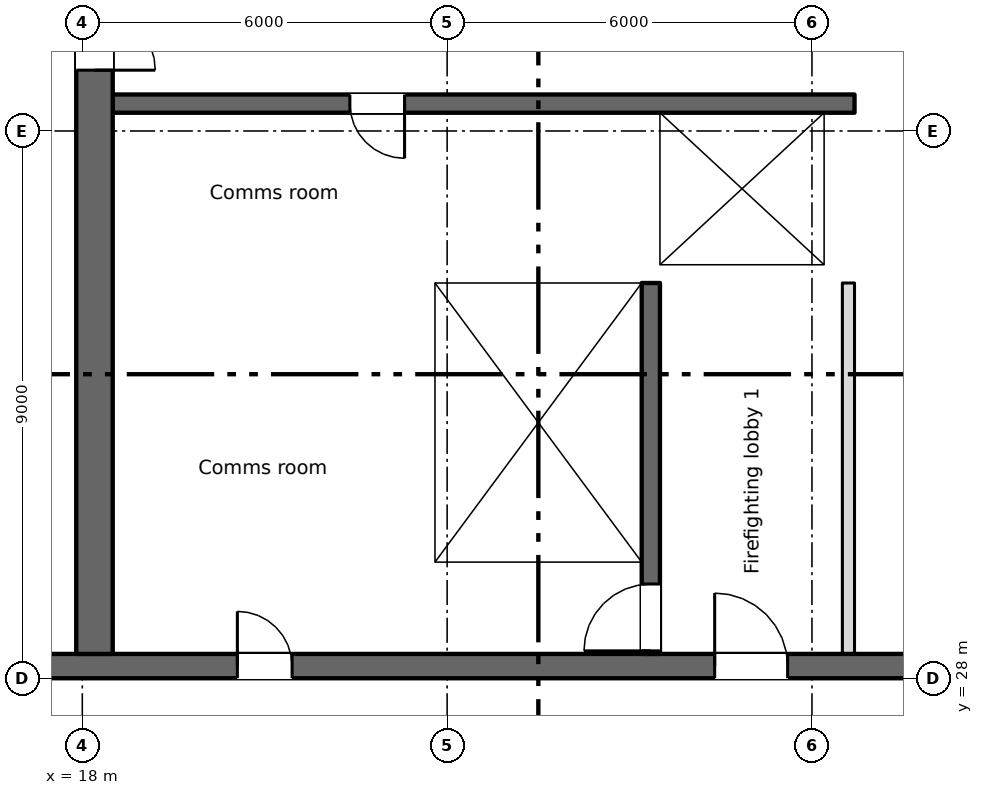
"""IFC4 building model, lengths in metres.
Left out: names, types, materials, properties, quantities, classifications, styles, units other than length and angle.
Written with IfcOpenShell. Run it as: python <this file> out.ifc"""

import sys

from ifc_helpers import new_model, si_unit, direction, frame, frame_2d, origin, place, context, subcontext, project, spatial, rectangle, extrude, element, fill, save


model = new_model("IFC4")
c1 = context("Model", 3, precision=1e-05, world=origin(), true_north=direction((0.0, 1.0)))
c2 = subcontext(c1, "Body", "Model", "MODEL_VIEW")
j1 = project(units=[si_unit("LENGTHUNIT", "METRE"), si_unit("PLANEANGLEUNIT", "RADIAN")], contexts=[c1])
p1 = place(None, origin())
s1 = spatial("IfcSite", under=j1, at=p1, CompositionType="ELEMENT")
p2 = place(p1, origin())
s2 = spatial("IfcBuilding", under=s1, at=p2, CompositionType="ELEMENT")
p3 = place(p2, frame((0.0, 0.0, 246.95)))
s3 = spatial("IfcBuildingStorey", under=s2, at=p3, CompositionType="ELEMENT", Elevation=246.95)
p4 = place(p3, frame((6.5, 28.2, 0.0), z_axis=(0.0, 0.0, 1.0), x_axis=(1.0, 0.0, 0.0)))
e1 = element("IfcWall", 1, at=p4, inside=s3, PredefinedType="SHEAR", context=c2, shape_type="SweptSolid", body=[
    extrude(rectangle(XDim=58.0, YDim=0.4, at=frame_2d((29.0, 0.0))), origin(), (0.0, 0.0, 1.0), 3.4),
])
p5 = place(p4, frame((14.05, 0.0, 0.0)))
e2 = element("IfcOpeningElement", 2, at=p5, cuts=e1, PredefinedType="OPENING", context=c2, shape_type="SweptSolid", body=[
    extrude(rectangle(XDim=0.9, YDim=2.1, at=frame_2d((0.45, 1.05))), frame((0.0, 0.21, 0.0), z_axis=(0.0, -1.0, 0.0), x_axis=(1.0, 0.0, 0.0)), (0.0, 0.0, 1.0), 0.42),
])
p6 = place(p4, frame((48.762, 0.0, 0.0)))
e3 = element("IfcOpeningElement", 3, at=p6, cuts=e1, PredefinedType="OPENING", context=c2, shape_type="SweptSolid", body=[
    extrude(rectangle(XDim=0.9, YDim=2.1, at=frame_2d((0.45, 1.05))), frame((0.0, 0.21, 0.0), z_axis=(0.0, -1.0, 0.0), x_axis=(1.0, 0.0, 0.0)), (0.0, 0.0, 1.0), 0.42),
])
p7 = place(p4, frame((51.337, 0.0, 0.0)))
e4 = element("IfcOpeningElement", 4, at=p7, cuts=e1, PredefinedType="OPENING", context=c2, shape_type="SweptSolid", body=[
    extrude(rectangle(XDim=0.9, YDim=2.1, at=frame_2d((0.45, 1.05))), frame((0.0, 0.21, 0.0), z_axis=(0.0, -1.0, 0.0), x_axis=(1.0, 0.0, 0.0)), (0.0, 0.0, 1.0), 0.42),
])
p8 = place(p4, frame((1.55, 0.0, 0.0)))
e5 = element("IfcOpeningElement", 5, at=p8, cuts=e1, PredefinedType="OPENING", context=c2, shape_type="SweptSolid", body=[
    extrude(rectangle(XDim=0.9, YDim=2.1, at=frame_2d((0.45, 1.05))), frame((0.0, 0.21, 0.0), z_axis=(0.0, -1.0, 0.0), x_axis=(1.0, 0.0, 0.0)), (0.0, 0.0, 1.0), 0.42),
])
p9 = place(p4, frame((4.9, 0.0, 0.0)))
e6 = element("IfcOpeningElement", 6, at=p9, cuts=e1, PredefinedType="OPENING", context=c2, shape_type="SweptSolid", body=[
    extrude(rectangle(XDim=1.2, YDim=2.1, at=frame_2d((0.6, 1.05))), frame((0.0, 0.21, 0.0), z_axis=(0.0, -1.0, 0.0), x_axis=(1.0, 0.0, 0.0)), (0.0, 0.0, 1.0), 0.42),
])
p10 = place(p4, frame((31.9, 0.0, 0.0)))
e7 = element("IfcOpeningElement", 7, at=p10, cuts=e1, PredefinedType="OPENING", context=c2, shape_type="SweptSolid", body=[
    extrude(rectangle(XDim=1.2, YDim=2.1, at=frame_2d((0.6, 1.05))), frame((0.0, 0.21, 0.0), z_axis=(0.0, -1.0, 0.0), x_axis=(1.0, 0.0, 0.0)), (0.0, 0.0, 1.0), 0.42),
])
p11 = place(p4, frame((55.4, 0.0, 0.0)))
e8 = element("IfcOpeningElement", 8, at=p11, cuts=e1, PredefinedType="OPENING", context=c2, shape_type="SweptSolid", body=[
    extrude(rectangle(XDim=1.2, YDim=2.1, at=frame_2d((0.6, 1.05))), frame((0.0, 0.21, 0.0), z_axis=(0.0, -1.0, 0.0), x_axis=(1.0, 0.0, 0.0)), (0.0, 0.0, 1.0), 0.42),
])
p12 = place(p4, frame((21.9, 0.0, 0.0)))
e9 = element("IfcOpeningElement", 9, at=p12, cuts=e1, PredefinedType="OPENING", context=c2, shape_type="SweptSolid", body=[
    extrude(rectangle(XDim=1.2, YDim=2.1, at=frame_2d((0.6, 1.05))), frame((0.0, 0.21, 0.0), z_axis=(0.0, -1.0, 0.0), x_axis=(1.0, 0.0, 0.0)), (0.0, 0.0, 1.0), 0.42),
])
p13 = place(p4, frame((41.9, 0.0, 0.0)))
e10 = element("IfcOpeningElement", 10, at=p13, cuts=e1, PredefinedType="OPENING", context=c2, shape_type="SweptSolid", body=[
    extrude(rectangle(XDim=1.2, YDim=2.1, at=frame_2d((0.6, 1.05))), frame((0.0, 0.21, 0.0), z_axis=(0.0, -1.0, 0.0), x_axis=(1.0, 0.0, 0.0)), (0.0, 0.0, 1.0), 0.42),
])
p14 = place(p4, frame((25.05, 0.0, 0.0)))
e11 = element("IfcOpeningElement", 11, at=p14, cuts=e1, PredefinedType="OPENING", context=c2, shape_type="SweptSolid", body=[
    extrude(rectangle(XDim=2.4, YDim=2.1, at=frame_2d((1.2, 1.05))), frame((0.0, 0.21, 0.0), z_axis=(0.0, -1.0, 0.0), x_axis=(1.0, 0.0, 0.0)), (0.0, 0.0, 1.0), 0.42),
])
p15 = place(p4, frame((37.55, 0.0, 0.0)))
e12 = element("IfcOpeningElement", 12, at=p15, cuts=e1, PredefinedType="OPENING", context=c2, shape_type="SweptSolid", body=[
    extrude(rectangle(XDim=2.4, YDim=2.1, at=frame_2d((1.2, 1.05))), frame((0.0, 0.21, 0.0), z_axis=(0.0, -1.0, 0.0), x_axis=(1.0, 0.0, 0.0)), (0.0, 0.0, 1.0), 0.42),
])
p16 = place(p4, frame((8.25, 0.0, 0.0)))
e13 = element("IfcOpeningElement", 13, at=p16, cuts=e1, PredefinedType="OPENING", context=c2, shape_type="SweptSolid", body=[
    extrude(rectangle(XDim=2.4, YDim=2.1, at=frame_2d((1.2, 1.05))), frame((0.0, 0.21, 0.0), z_axis=(0.0, -1.0, 0.0), x_axis=(1.0, 0.0, 0.0)), (0.0, 0.0, 1.0), 0.42),
])
p17 = place(p4, frame((29.05, 0.0, 0.0)))
e14 = element("IfcOpeningElement", 14, at=p17, cuts=e1, PredefinedType="OPENING", context=c2, shape_type="SweptSolid", body=[
    extrude(rectangle(XDim=0.9, YDim=2.1, at=frame_2d((0.45, 1.05))), frame((0.0, 0.21, 0.0), z_axis=(0.0, -1.0, 0.0), x_axis=(1.0, 0.0, 0.0)), (0.0, 0.0, 1.0), 0.42),
])
p18 = place(p4, frame((35.05, 0.0, 0.0)))
e15 = element("IfcOpeningElement", 15, at=p18, cuts=e1, PredefinedType="OPENING", context=c2, shape_type="SweptSolid", body=[
    extrude(rectangle(XDim=0.9, YDim=2.1, at=frame_2d((0.45, 1.05))), frame((0.0, 0.21, 0.0), z_axis=(0.0, -1.0, 0.0), x_axis=(1.0, 0.0, 0.0)), (0.0, 0.0, 1.0), 0.42),
])
p19 = place(p3, frame((18.2, 28.4, 0.0), z_axis=(0.0, 0.0, 1.0), x_axis=(0.0, 1.0, 0.0)))
e16 = element("IfcWall", 16, at=p19, inside=s3, PredefinedType="SHEAR", context=c2, shape_type="SweptSolid", body=[
    extrude(rectangle(XDim=17.0, YDim=0.6, at=frame_2d((8.5, 0.0))), origin(), (0.0, 0.0, 1.0), 3.4),
])
p20 = place(p19, frame((9.6, 0.0, 0.0)))
e17 = element("IfcOpeningElement", 17, at=p20, cuts=e16, PredefinedType="OPENING", context=c2, shape_type="SweptSolid", body=[
    extrude(rectangle(XDim=2.0, YDim=2.1, at=frame_2d((1.0, 1.05))), frame((0.0, 0.31, 0.0), z_axis=(0.0, -1.0, 0.0), x_axis=(1.0, 0.0, 0.0)), (0.0, 0.0, 1.0), 0.62),
])
p21 = place(p19, frame((15.45, 0.0, 0.0)))
e18 = element("IfcOpeningElement", 18, at=p21, cuts=e16, PredefinedType="OPENING", context=c2, shape_type="SweptSolid", body=[
    extrude(rectangle(XDim=1.2, YDim=2.1, at=frame_2d((0.6, 1.05))), frame((0.0, 0.31, 0.0), z_axis=(0.0, -1.0, 0.0), x_axis=(1.0, 0.0, 0.0)), (0.0, 0.0, 1.0), 0.62),
])
p22 = place(p3, frame((23.65, 28.4, 0.0), z_axis=(0.0, 0.0, 1.0), x_axis=(0.0, 1.0, 0.0)))
e19 = element("IfcWall", 19, at=p22, inside=s3, PredefinedType="SHEAR", context=c2, shape_type="SweptSolid", body=[
    extrude(rectangle(XDim=6.1, YDim=0.3, at=frame_2d((3.05, 0.0))), origin(), (0.0, 0.0, 1.0), 3.4),
])
p23 = place(p3, frame((27.35, 28.4, 0.0), z_axis=(0.0, 0.0, 1.0), x_axis=(0.0, 1.0, 0.0)))
e20 = element("IfcWall", 20, at=p23, inside=s3, PredefinedType="SHEAR", context=c2, shape_type="SweptSolid", body=[
    extrude(rectangle(XDim=6.1, YDim=0.3, at=frame_2d((3.05, 0.0))), origin(), (0.0, 0.0, 1.0), 3.4),
])
p24 = place(p23, frame((0.05, 0.0, 0.0)))
e21 = element("IfcOpeningElement", 21, at=p24, cuts=e20, PredefinedType="OPENING", context=c2, shape_type="SweptSolid", body=[
    extrude(rectangle(XDim=1.1, YDim=2.1, at=frame_2d((0.55, 1.05))), frame((0.0, 0.16, 0.0), z_axis=(0.0, -1.0, 0.0), x_axis=(1.0, 0.0, 0.0)), (0.0, 0.0, 1.0), 0.32),
])
p25 = place(p3, frame((18.5, 34.65, 0.0), z_axis=(0.0, 0.0, 1.0), x_axis=(1.0, 0.0, 0.0)))
e22 = element("IfcWall", 22, at=p25, inside=s3, PredefinedType="SHEAR", context=c2, shape_type="SweptSolid", body=[
    extrude(rectangle(XDim=12.2, YDim=0.3, at=frame_2d((6.1, 0.0))), origin(), (0.0, 0.0, 1.0), 3.4),
])
p26 = place(p25, frame((9.8, 0.0, 0.0)))
e23 = element("IfcOpeningElement", 23, at=p26, cuts=e22, PredefinedType="OPENING", context=c2, shape_type="SweptSolid", body=[
    extrude(rectangle(XDim=1.1, YDim=2.1, at=frame_2d((0.55, 1.05))), frame((0.0, 0.16, 0.0), z_axis=(0.0, -1.0, 0.0), x_axis=(1.0, 0.0, 0.0)), (0.0, 0.0, 1.0), 0.32),
])
p27 = place(p3, frame((30.7, 37.45, 0.0), z_axis=(0.0, 0.0, 1.0), x_axis=(-1.0, 0.0, 0.0)))
e24 = element("IfcWall", 24, at=p27, inside=s3, PredefinedType="SHEAR", context=c2, shape_type="SweptSolid", body=[
    extrude(rectangle(XDim=12.2, YDim=0.3, at=frame_2d((6.1, 0.0))), origin(), (0.0, 0.0, 1.0), 3.4),
])
p28 = place(p27, frame((7.4, 0.0, 0.0)))
e25 = element("IfcOpeningElement", 25, at=p28, cuts=e24, PredefinedType="OPENING", context=c2, shape_type="SweptSolid", body=[
    extrude(rectangle(XDim=0.9, YDim=2.1, at=frame_2d((0.45, 1.05))), frame((0.0, 0.16, 0.0), z_axis=(0.0, -1.0, 0.0), x_axis=(1.0, 0.0, 0.0)), (0.0, 0.0, 1.0), 0.32),
])
p29 = place(p3, frame((27.35, 34.8, 0.0), z_axis=(0.0, 0.0, 1.0), x_axis=(0.0, 1.0, 0.0)))
e26 = element("IfcWall", 26, at=p29, inside=s3, PredefinedType="SHEAR", context=c2, shape_type="SweptSolid", body=[
    extrude(rectangle(XDim=2.5, YDim=0.3, at=frame_2d((1.25, 0.0))), origin(), (0.0, 0.0, 1.0), 3.4),
])
p30 = place(p3, frame((30.45, 34.8, 0.0), z_axis=(0.0, 0.0, 1.0), x_axis=(0.0, 1.0, 0.0)))
e27 = element("IfcWall", 27, at=p30, inside=s3, PredefinedType="SHEAR", context=c2, shape_type="SweptSolid", body=[
    extrude(rectangle(XDim=2.5, YDim=0.5, at=frame_2d((1.25, 0.0))), origin(), (0.0, 0.0, 1.0), 3.4),
])
p31 = place(p3, frame((30.6, 28.4, 0.0), z_axis=(0.0, 0.0, 1.0), x_axis=(0.0, 1.0, 0.0)))
e28 = element("IfcWall", 28, at=p31, inside=s3, PredefinedType="PARTITIONING", context=c2, shape_type="SweptSolid", body=[
    extrude(rectangle(XDim=6.1, YDim=0.2, at=frame_2d((3.05, 0.0))), origin(), (0.0, 0.0, 1.0), 3.4),
])
p32 = place(p5, origin())
e29 = element("IfcDoor", 29, at=p32, inside=s3, OperationType="SINGLE_SWING_LEFT", PredefinedType="DOOR", context=c2, shape_type="SweptSolid", body=[
    extrude(rectangle(XDim=0.9, YDim=2.1, at=frame_2d((0.45, 1.05))), frame((0.0, 0.025, 0.0), z_axis=(0.0, -1.0, 0.0), x_axis=(1.0, 0.0, 0.0)), (0.0, 0.0, 1.0), 0.05),
])
fill(e2, e29)
p33 = place(p28, origin())
e30 = element("IfcDoor", 30, at=p33, inside=s3, OperationType="SINGLE_SWING_LEFT", PredefinedType="DOOR", context=c2, shape_type="SweptSolid", body=[
    extrude(rectangle(XDim=0.9, YDim=2.1, at=frame_2d((0.45, 1.05))), frame((0.0, 0.025, 0.0), z_axis=(0.0, -1.0, 0.0), x_axis=(1.0, 0.0, 0.0)), (0.0, 0.0, 1.0), 0.05),
])
fill(e25, e30)
p34 = place(p26, origin())
e31 = element("IfcDoor", 31, at=p34, inside=s3, OperationType="SLIDING_TO_LEFT", PredefinedType="DOOR", context=c2, shape_type="SweptSolid", body=[
    extrude(rectangle(XDim=1.1, YDim=2.1, at=frame_2d((0.55, 1.05))), frame((0.0, 0.025, 0.0), z_axis=(0.0, -1.0, 0.0), x_axis=(1.0, 0.0, 0.0)), (0.0, 0.0, 1.0), 0.05),
])
fill(e23, e31)
p35 = place(p24, origin())
e32 = element("IfcDoor", 32, at=p35, inside=s3, OperationType="SINGLE_SWING_LEFT", PredefinedType="DOOR", context=c2, shape_type="SweptSolid", body=[
    extrude(rectangle(XDim=1.1, YDim=2.1, at=frame_2d((0.55, 1.05))), frame((0.0, 0.025, 0.0), z_axis=(0.0, -1.0, 0.0), x_axis=(1.0, 0.0, 0.0)), (0.0, 0.0, 1.0), 0.05),
])
fill(e21, e32)
p36 = place(p12, origin())
e33 = element("IfcDoor", 33, at=p36, inside=s3, OperationType="SINGLE_SWING_LEFT", PredefinedType="DOOR", context=c2, shape_type="SweptSolid", body=[
    extrude(rectangle(XDim=1.2, YDim=2.1, at=frame_2d((0.6, 1.05))), frame((0.0, 0.025, 0.0), z_axis=(0.0, -1.0, 0.0), x_axis=(1.0, 0.0, 0.0)), (0.0, 0.0, 1.0), 0.05),
])
fill(e9, e33)
p37 = place(p20, origin())
e34 = element("IfcDoor", 34, at=p37, inside=s3, OperationType="DOUBLE_DOOR_SINGLE_SWING", PredefinedType="DOOR", context=c2, shape_type="SweptSolid", body=[
    extrude(rectangle(XDim=2.0, YDim=2.1, at=frame_2d((1.0, 1.05))), frame((0.0, 0.025, 0.0), z_axis=(0.0, -1.0, 0.0), x_axis=(1.0, 0.0, 0.0)), (0.0, 0.0, 1.0), 0.05),
])
fill(e17, e34)
save(model, sys.argv[1])
